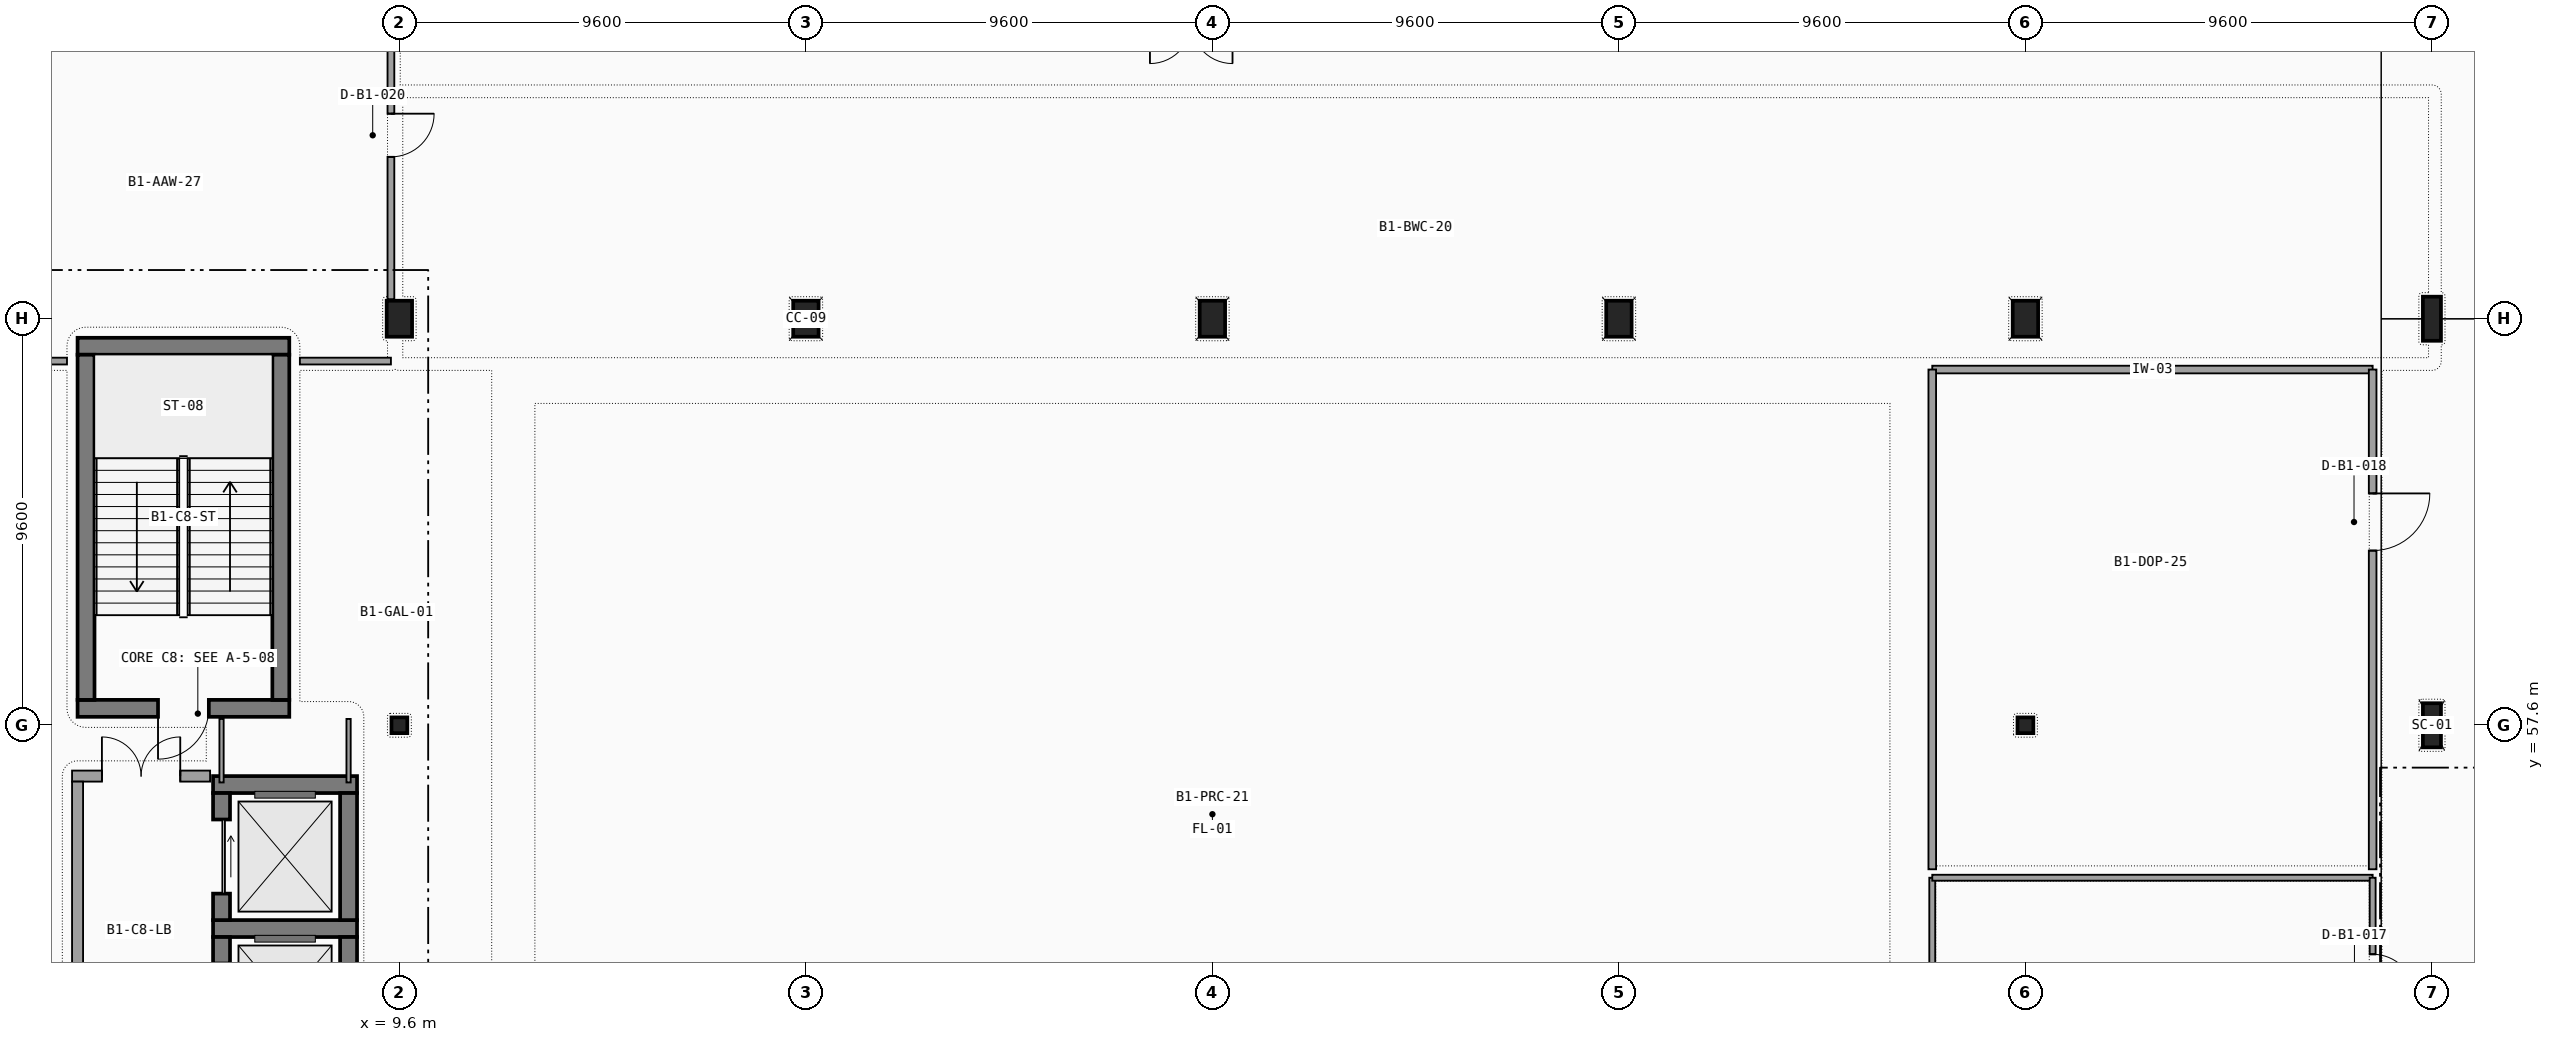
"""IFC4 building model, lengths in metres.
Left out: names, types, materials, properties, quantities, classifications, styles, units other than length and angle.
Written with IfcOpenShell. Run it as: python <this file> out.ifc"""

import sys

from ifc_helpers import new_model, si_unit, direction, frame, frame_2d, origin, origin_2d, place, context, subcontext, project, spatial, rectangle, i_section, extrude, element, fill, save


model = new_model("IFC4")
c1 = context("Model", 3, precision=1e-05, world=origin(), true_north=direction((0.0, 1.0)))
c2 = subcontext(c1, "Body", "Model", "MODEL_VIEW")
j1 = project(units=[si_unit("LENGTHUNIT", "METRE"), si_unit("PLANEANGLEUNIT", "RADIAN")], contexts=[c1])
p1 = place(None, origin())
s1 = spatial("IfcSite", under=j1, at=p1, CompositionType="ELEMENT")
p2 = place(p1, origin())
s2 = spatial("IfcBuilding", under=s1, at=p2, CompositionType="ELEMENT")
p3 = place(p2, frame((0.0, 0.0, -4.8)))
s3 = spatial("IfcBuildingStorey", under=s2, at=p3, CompositionType="ELEMENT", Elevation=-4.8)
p4 = place(p3, frame((9.6, 57.6, 0.0), z_axis=(0.0, 0.0, 1.0), x_axis=(1.0, 0.0, 0.0)))
e1 = element("IfcColumn", 1, at=p4, inside=s3, PredefinedType="COLUMN", context=c2, shape_type="SweptSolid", body=[
    extrude(i_section(OverallWidth=0.374, OverallDepth=0.372, WebThickness=0.016, FlangeThickness=0.026, FilletRadius=0.015, at=origin_2d()), origin(), (0.0, 0.0, 1.0), 4.8),
])
for number, where, z_axis, x_axis in (
    (2, (9.6, 67.2, 0.0), (0.0, 0.0, 1.0), (1.0, 0.0, 0.0)),
    (3, (19.2, 67.2, 0.0), (0.0, 0.0, 1.0), (1.0, 0.0, 0.0)),
    (4, (28.8, 67.2, 0.0), (0.0, 0.0, 1.0), (1.0, 0.0, 0.0)),
    (5, (38.4, 67.2, 0.0), (0.0, 0.0, 1.0), (1.0, 0.0, 0.0)),
):
    element("IfcColumn", number, at=place(p3, frame(where, z_axis=z_axis, x_axis=x_axis)), inside=s3, PredefinedType="COLUMN", context=c2, shape_type="SweptSolid", body=[
        extrude(rectangle(XDim=0.6, YDim=0.85, at=origin_2d()), origin(), (0.0, 0.0, 1.0), 4.8),
    ])
p5 = place(p3, frame((48.0, 57.6, 0.0), z_axis=(0.0, 0.0, 1.0), x_axis=(1.0, 0.0, 0.0)))
e6 = element("IfcColumn", 6, at=p5, inside=s3, PredefinedType="COLUMN", context=c2, shape_type="SweptSolid", body=[
    extrude(i_section(OverallWidth=0.374, OverallDepth=0.372, WebThickness=0.016, FlangeThickness=0.026, FilletRadius=0.015, at=origin_2d()), origin(), (0.0, 0.0, 1.0), 4.8),
])
p6 = place(p3, frame((48.0, 67.2, 0.0), z_axis=(0.0, 0.0, 1.0), x_axis=(1.0, 0.0, 0.0)))
e7 = element("IfcColumn", 7, at=p6, inside=s3, PredefinedType="COLUMN", context=c2, shape_type="SweptSolid", body=[
    extrude(rectangle(XDim=0.6, YDim=0.85, at=origin_2d()), origin(), (0.0, 0.0, 1.0), 4.8),
])
for number, where, z_axis, x_axis in (
    (8, (57.6, 57.6, 0.0), (0.0, 0.0, 1.0), (1.0, 0.0, 0.0)),
    (9, (57.6, 67.2, 0.0), (0.0, 0.0, 1.0), (1.0, 0.0, 0.0)),
):
    element("IfcColumn", number, at=place(p3, frame(where, z_axis=z_axis, x_axis=x_axis)), inside=s3, PredefinedType="COLUMN", context=c2, shape_type="SweptSolid", body=[
        extrude(i_section(OverallWidth=0.427, OverallDepth=1.042, WebThickness=0.031, FlangeThickness=0.056, FilletRadius=0.031, at=origin_2d()), origin(), (0.0, 0.0, 1.0), 4.8),
    ])
p7 = place(p3, frame((2.0, 58.0, 0.0), z_axis=(0.0, 0.0, 1.0), x_axis=(1.0, 0.0, 0.0)))
e10 = element("IfcWall", 10, at=p7, inside=s3, PredefinedType="SHEAR", context=c2, shape_type="SweptSolid", body=[
    extrude(rectangle(XDim=5.0, YDim=0.4, at=frame_2d((2.5, 0.0))), origin(), (0.0, 0.0, 1.0), 4.5),
])
p8 = place(p7, frame((3.1, 0.0, 0.0), z_axis=(0.0, 0.0, 1.0), x_axis=(-1.0, 0.0, 0.0)))
e11 = element("IfcOpeningElement", 11, at=p8, cuts=e10, PredefinedType="OPENING", context=c2, shape_type="SweptSolid", body=[
    extrude(rectangle(XDim=1.2, YDim=2.2, at=frame_2d((0.6, 1.1))), frame((0.0, 0.21, 0.0), z_axis=(0.0, -1.0, 0.0), x_axis=(1.0, 0.0, 0.0)), (0.0, 0.0, 1.0), 0.42),
])
p9 = place(p3, frame((7.0, 66.55, 0.0), z_axis=(0.0, 0.0, 1.0), x_axis=(-1.0, 0.0, 0.0)))
e12 = element("IfcWall", 12, at=p9, inside=s3, PredefinedType="SHEAR", context=c2, shape_type="SweptSolid", body=[
    extrude(rectangle(XDim=5.0, YDim=0.4, at=frame_2d((2.5, 0.0))), origin(), (0.0, 0.0, 1.0), 4.5),
])
for number, where, z_axis, x_axis in (
    (13, (2.2, 66.35, 0.0), (0.0, 0.0, 1.0), (0.0, -1.0, 0.0)),
    (14, (6.8, 58.2, 0.0), (0.0, 0.0, 1.0), (0.0, 1.0, 0.0)),
):
    element("IfcWall", number, at=place(p3, frame(where, z_axis=z_axis, x_axis=x_axis)), inside=s3, PredefinedType="SHEAR", context=c2, shape_type="SweptSolid", body=[
        extrude(rectangle(XDim=8.15, YDim=0.4, at=frame_2d((4.075, 0.0))), origin(), (0.0, 0.0, 1.0), 4.5),
    ])
p10 = place(p3, frame((8.6, 52.8, 0.0), z_axis=(0.0, 0.0, 1.0), x_axis=(-1.0, 0.0, 0.0)))
e15 = element("IfcWall", 15, at=p10, inside=s3, PredefinedType="SHEAR", context=c2, shape_type="SweptSolid", body=[
    extrude(rectangle(XDim=3.4, YDim=0.4, at=frame_2d((1.7, 0.0))), origin(), (0.0, 0.0, 1.0), 4.5),
])
p11 = place(p3, frame((5.4, 52.6, 0.0), z_axis=(0.0, 0.0, 1.0), x_axis=(0.0, -1.0, 0.0)))
e16 = element("IfcWall", 16, at=p11, inside=s3, PredefinedType="SHEAR", context=c2, shape_type="SweptSolid", body=[
    extrude(rectangle(XDim=3.0, YDim=0.4, at=frame_2d((1.5, 0.0))), origin(), (0.0, 0.0, 1.0), 4.5),
])
p12 = place(p11, frame((0.625, 0.0, 0.0), z_axis=(0.0, 0.0, 1.0), x_axis=(1.0, 0.0, 0.0)))
e17 = element("IfcOpeningElement", 17, at=p12, cuts=e16, PredefinedType="OPENING", context=c2, shape_type="SweptSolid", body=[
    extrude(rectangle(XDim=1.75, YDim=2.35, at=frame_2d((0.875, 1.175))), frame((0.0, 0.21, 0.0), z_axis=(0.0, -1.0, 0.0), x_axis=(1.0, 0.0, 0.0)), (0.0, 0.0, 1.0), 0.42),
])
p13 = place(p3, frame((8.4, 49.6, 0.0), z_axis=(0.0, 0.0, 1.0), x_axis=(0.0, 1.0, 0.0)))
e18 = element("IfcWall", 18, at=p13, inside=s3, PredefinedType="SHEAR", context=c2, shape_type="SweptSolid", body=[
    extrude(rectangle(XDim=3.0, YDim=0.4, at=frame_2d((1.5, 0.0))), origin(), (0.0, 0.0, 1.0), 4.5),
])
p14 = place(p3, frame((8.6, 56.2, 0.0), z_axis=(0.0, 0.0, 1.0), x_axis=(-1.0, 0.0, 0.0)))
e19 = element("IfcWall", 19, at=p14, inside=s3, PredefinedType="SHEAR", context=c2, shape_type="SweptSolid", body=[
    extrude(rectangle(XDim=3.4, YDim=0.4, at=frame_2d((1.7, 0.0))), origin(), (0.0, 0.0, 1.0), 4.5),
])
p15 = place(p3, frame((5.4, 56.0, 0.0), z_axis=(0.0, 0.0, 1.0), x_axis=(0.0, -1.0, 0.0)))
e20 = element("IfcWall", 20, at=p15, inside=s3, PredefinedType="SHEAR", context=c2, shape_type="SweptSolid", body=[
    extrude(rectangle(XDim=3.0, YDim=0.4, at=frame_2d((1.5, 0.0))), origin(), (0.0, 0.0, 1.0), 4.5),
])
p16 = place(p15, frame((0.625, 0.0, 0.0), z_axis=(0.0, 0.0, 1.0), x_axis=(1.0, 0.0, 0.0)))
e21 = element("IfcOpeningElement", 21, at=p16, cuts=e20, PredefinedType="OPENING", context=c2, shape_type="SweptSolid", body=[
    extrude(rectangle(XDim=1.75, YDim=2.35, at=frame_2d((0.875, 1.175))), frame((0.0, 0.21, 0.0), z_axis=(0.0, -1.0, 0.0), x_axis=(1.0, 0.0, 0.0)), (0.0, 0.0, 1.0), 0.42),
])
p17 = place(p3, frame((8.4, 53.0, 0.0), z_axis=(0.0, 0.0, 1.0), x_axis=(0.0, 1.0, 0.0)))
e22 = element("IfcWall", 22, at=p17, inside=s3, PredefinedType="SHEAR", context=c2, shape_type="SweptSolid", body=[
    extrude(rectangle(XDim=3.0, YDim=0.4, at=frame_2d((1.5, 0.0))), origin(), (0.0, 0.0, 1.0), 4.5),
])
for number, where, z_axis, x_axis in (
    (23, (5.4, 57.75, 0.0), (0.0, 0.0, 1.0), (0.0, -1.0, 0.0)),
    (24, (8.4, 56.25, 0.0), (0.0, 0.0, 1.0), (0.0, 1.0, 0.0)),
):
    element("IfcWall", number, at=place(p3, frame(where, z_axis=z_axis, x_axis=x_axis)), inside=s3, PredefinedType="PARTITIONING", context=c2, shape_type="SweptSolid", body=[
        extrude(rectangle(XDim=1.5, YDim=0.1, at=frame_2d((0.75, 0.0))), origin(), (0.0, 0.0, 1.0), 4.5),
    ])
p18 = place(p3, frame((5.13, 56.4, 0.0), z_axis=(0.0, 0.0, 1.0), x_axis=(-1.0, 0.0, 0.0)))
e25 = element("IfcWall", 25, at=p18, inside=s3, PredefinedType="SOLIDWALL", context=c2, shape_type="SweptSolid", body=[
    extrude(rectangle(XDim=3.26, YDim=0.26, at=frame_2d((1.63, 0.0))), origin(), (0.0, 0.0, 1.0), 4.5),
])
p19 = place(p18, frame((2.555, 0.0, 0.0), z_axis=(0.0, 0.0, 1.0), x_axis=(-1.0, 0.0, 0.0)))
e26 = element("IfcOpeningElement", 26, at=p19, cuts=e25, PredefinedType="OPENING", context=c2, shape_type="SweptSolid", body=[
    extrude(rectangle(XDim=1.85, YDim=2.25, at=frame_2d((0.925, 1.125))), frame((0.0, 0.14, 0.0), z_axis=(0.0, -1.0, 0.0), x_axis=(1.0, 0.0, 0.0)), (0.0, 0.0, 1.0), 0.28),
])
p20 = place(p3, frame((2.0, 56.27, 0.0), z_axis=(0.0, 0.0, 1.0), x_axis=(0.0, -1.0, 0.0)))
e27 = element("IfcWall", 27, at=p20, inside=s3, PredefinedType="SOLIDWALL", context=c2, shape_type="SweptSolid", body=[
    extrude(rectangle(XDim=6.74, YDim=0.26, at=frame_2d((3.37, 0.0))), origin(), (0.0, 0.0, 1.0), 4.5),
])
p21 = place(p3, frame((45.8, 38.6, 0.0), z_axis=(0.0, 0.0, 1.0), x_axis=(0.0, 1.0, 0.0)))
e28 = element("IfcWall", 28, at=p21, inside=s3, PredefinedType="PARTITIONING", context=c2, shape_type="SweptSolid", body=[
    extrude(rectangle(XDim=15.4, YDim=0.14, at=frame_2d((7.7, 0.0))), origin(), (0.0, 0.0, 1.0), 3.6),
])
p22 = place(p3, frame((45.8, 54.0, 0.0), z_axis=(0.0, 0.0, 1.0), x_axis=(1.0, 0.0, 0.0)))
e29 = element("IfcWall", 29, at=p22, inside=s3, PredefinedType="PARTITIONING", context=c2, shape_type="SweptSolid", body=[
    extrude(rectangle(XDim=10.4, YDim=0.14, at=frame_2d((5.2, 0.0))), origin(), (0.0, 0.0, 1.0), 3.738),
])
p23 = place(p3, frame((56.2, 54.0, 0.0), z_axis=(0.0, 0.0, 1.0), x_axis=(0.0, -1.0, 0.0)))
e30 = element("IfcWall", 30, at=p23, inside=s3, PredefinedType="PARTITIONING", context=c2, shape_type="SweptSolid", body=[
    extrude(rectangle(XDim=15.4, YDim=0.14, at=frame_2d((7.7, 0.0))), origin(), (0.0, 0.0, 1.0), 3.6),
])
p24 = place(p23, frame((1.807, 0.0, 0.0), z_axis=(0.0, 0.0, 1.0), x_axis=(1.0, 0.0, 0.0)))
e31 = element("IfcOpeningElement", 31, at=p24, cuts=e30, PredefinedType="OPENING", context=c2, shape_type="SweptSolid", body=[
    extrude(rectangle(XDim=1.0, YDim=2.2, at=frame_2d((0.5, 1.1))), frame((0.0, 0.08, 0.0), z_axis=(0.0, -1.0, 0.0), x_axis=(1.0, 0.0, 0.0)), (0.0, 0.0, 1.0), 0.16),
])
p25 = place(p3, frame((45.8, 66.0, 0.0), z_axis=(0.0, 0.0, 1.0), x_axis=(1.0, 0.0, 0.0)))
e32 = element("IfcWall", 32, at=p25, inside=s3, PredefinedType="PARTITIONING", context=c2, shape_type="SweptSolid", body=[
    extrude(rectangle(XDim=10.4, YDim=0.18, at=frame_2d((5.2, 0.0))), origin(), (0.0, 0.0, 1.0), 3.738),
])
p26 = place(p3, frame((56.2, 66.0, 0.0), z_axis=(0.0, 0.0, 1.0), x_axis=(0.0, -1.0, 0.0)))
e33 = element("IfcWall", 33, at=p26, inside=s3, PredefinedType="PARTITIONING", context=c2, shape_type="SweptSolid", body=[
    extrude(rectangle(XDim=11.8, YDim=0.18, at=frame_2d((5.9, 0.0))), origin(), (0.0, 0.0, 1.0), 3.6),
])
p27 = place(p26, frame((2.925, 0.0, 0.0), z_axis=(0.0, 0.0, 1.0), x_axis=(1.0, 0.0, 0.0)))
e34 = element("IfcOpeningElement", 34, at=p27, cuts=e33, PredefinedType="OPENING", context=c2, shape_type="SweptSolid", body=[
    extrude(rectangle(XDim=1.35, YDim=2.25, at=frame_2d((0.675, 1.125))), frame((0.0, 0.1, 0.0), z_axis=(0.0, -1.0, 0.0), x_axis=(1.0, 0.0, 0.0)), (0.0, 0.0, 1.0), 0.2),
])
p28 = place(p3, frame((45.8, 54.2, 0.0), z_axis=(0.0, 0.0, 1.0), x_axis=(0.0, 1.0, 0.0)))
e35 = element("IfcWall", 35, at=p28, inside=s3, PredefinedType="PARTITIONING", context=c2, shape_type="SweptSolid", body=[
    extrude(rectangle(XDim=11.8, YDim=0.18, at=frame_2d((5.9, 0.0))), origin(), (0.0, 0.0, 1.0), 4.5),
])
p29 = place(p3, frame((1.75, 66.2, 0.0), z_axis=(0.0, 0.0, 1.0), x_axis=(-1.0, 0.0, 0.0)))
e36 = element("IfcWall", 36, at=p29, inside=s3, PredefinedType="PARTITIONING", context=c2, shape_type="SweptSolid", body=[
    extrude(rectangle(XDim=1.35, YDim=0.16, at=frame_2d((0.675, 0.0))), origin(), (0.0, 0.0, 1.0), 4.5),
])
p30 = place(p3, frame((9.4, 74.0, 0.0), z_axis=(0.0, 0.0, 1.0), x_axis=(0.0, -1.0, 0.0)))
e37 = element("IfcWall", 37, at=p30, inside=s3, PredefinedType="PARTITIONING", context=c2, shape_type="SweptSolid", body=[
    extrude(rectangle(XDim=6.34, YDim=0.16, at=frame_2d((3.17, 0.0))), origin(), (0.0, 0.0, 1.0), 3.738),
])
p31 = place(p30, frame((1.958, 0.0, 0.0), z_axis=(0.0, 0.0, 1.0), x_axis=(1.0, 0.0, 0.0)))
e38 = element("IfcOpeningElement", 38, at=p31, cuts=e37, PredefinedType="OPENING", context=c2, shape_type="SweptSolid", body=[
    extrude(rectangle(XDim=1.02, YDim=2.15, at=frame_2d((0.51, 1.075))), frame((0.0, 0.09, 0.0), z_axis=(0.0, -1.0, 0.0), x_axis=(1.0, 0.0, 0.0)), (0.0, 0.0, 1.0), 0.18),
])
p32 = place(p3, frame((9.4, 66.2, 0.0), z_axis=(0.0, 0.0, 1.0), x_axis=(-1.0, 0.0, 0.0)))
e39 = element("IfcWall", 39, at=p32, inside=s3, PredefinedType="PARTITIONING", context=c2, shape_type="SweptSolid", body=[
    extrude(rectangle(XDim=2.15, YDim=0.16, at=frame_2d((1.075, 0.0))), origin(), (0.0, 0.0, 1.0), 4.5),
])
p33 = place(p8, origin())
e40 = element("IfcDoor", 40, at=p33, inside=s3, OperationType="SINGLE_SWING_RIGHT", PredefinedType="DOOR", context=c2, shape_type="SweptSolid", body=[
    extrude(rectangle(XDim=1.2, YDim=2.2, at=frame_2d((0.6, 1.1))), frame((0.0, 0.025, 0.0), z_axis=(0.0, -1.0, 0.0), x_axis=(1.0, 0.0, 0.0)), (0.0, 0.0, 1.0), 0.05),
])
fill(e11, e40)
p34 = place(p16, origin())
e41 = element("IfcDoor", 41, at=p34, inside=s3, OperationType="SLIDING_TO_LEFT", PredefinedType="DOOR", context=c2, shape_type="SweptSolid", body=[
    extrude(rectangle(XDim=1.75, YDim=2.35, at=frame_2d((0.875, 1.175))), frame((0.0, 0.025, 0.0), z_axis=(0.0, -1.0, 0.0), x_axis=(1.0, 0.0, 0.0)), (0.0, 0.0, 1.0), 0.05),
])
fill(e21, e41)
p35 = place(p19, origin())
e42 = element("IfcDoor", 42, at=p35, inside=s3, OperationType="DOUBLE_DOOR_SINGLE_SWING", PredefinedType="DOOR", context=c2, shape_type="SweptSolid", body=[
    extrude(rectangle(XDim=1.85, YDim=2.25, at=frame_2d((0.925, 1.125))), frame((0.0, 0.025, 0.0), z_axis=(0.0, -1.0, 0.0), x_axis=(1.0, 0.0, 0.0)), (0.0, 0.0, 1.0), 0.05),
])
fill(e26, e42)
p36 = place(p24, origin())
e43 = element("IfcDoor", 43, at=p36, inside=s3, OperationType="SINGLE_SWING_RIGHT", PredefinedType="DOOR", context=c2, shape_type="SweptSolid", body=[
    extrude(rectangle(XDim=1.0, YDim=2.2, at=frame_2d((0.5, 1.1))), frame((0.0, 0.025, 0.0), z_axis=(0.0, -1.0, 0.0), x_axis=(1.0, 0.0, 0.0)), (0.0, 0.0, 1.0), 0.05),
])
fill(e31, e43)
p37 = place(p27, origin())
e44 = element("IfcDoor", 44, at=p37, inside=s3, OperationType="SINGLE_SWING_LEFT", PredefinedType="DOOR", context=c2, shape_type="SweptSolid", body=[
    extrude(rectangle(XDim=1.35, YDim=2.25, at=frame_2d((0.675, 1.125))), frame((0.0, 0.025, 0.0), z_axis=(0.0, -1.0, 0.0), x_axis=(1.0, 0.0, 0.0)), (0.0, 0.0, 1.0), 0.05),
])
fill(e34, e44)
p38 = place(p31, origin())
e45 = element("IfcDoor", 45, at=p38, inside=s3, OperationType="SINGLE_SWING_LEFT", PredefinedType="DOOR", context=c2, shape_type="SweptSolid", body=[
    extrude(rectangle(XDim=1.02, YDim=2.15, at=frame_2d((0.51, 1.075))), frame((0.0, 0.025, 0.0), z_axis=(0.0, -1.0, 0.0), x_axis=(1.0, 0.0, 0.0)), (0.0, 0.0, 1.0), 0.05),
])
fill(e38, e45)
save(model, sys.argv[1])
